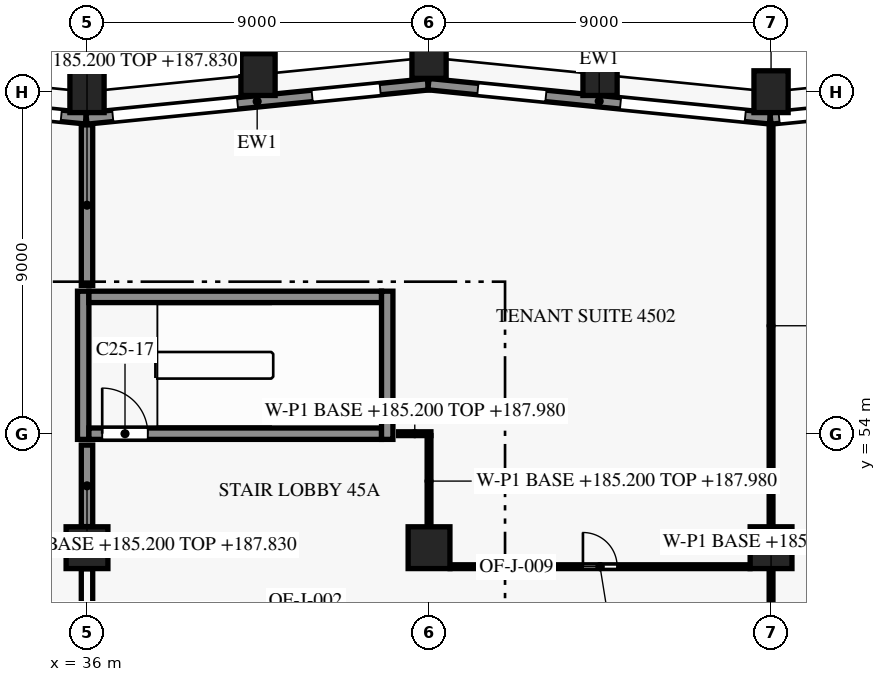
"""IFC4 building model, lengths in metres.
Left out: names, types, materials, properties, quantities, classifications, styles, units other than length and angle.
Written with IfcOpenShell. Run it as: python <this file> out.ifc"""

import sys

from ifc_helpers import new_model, si_unit, direction, frame, frame_2d, origin, origin_2d, place, context, subcontext, project, spatial, rectangle, extrude, element, fill, save


model = new_model("IFC4")
c1 = context("Model", 3, precision=1e-05, world=origin(), true_north=direction((0.0, 1.0)))
c2 = subcontext(c1, "Body", "Model", "MODEL_VIEW")
j1 = project(units=[si_unit("LENGTHUNIT", "METRE"), si_unit("PLANEANGLEUNIT", "RADIAN")], contexts=[c1])
p1 = place(None, origin())
s1 = spatial("IfcSite", under=j1, at=p1, CompositionType="ELEMENT")
p2 = place(p1, origin())
s2 = spatial("IfcBuilding", under=s1, at=p2, CompositionType="ELEMENT")
p3 = place(p2, frame((0.0, 0.0, 185.2)))
s3 = spatial("IfcBuildingStorey", under=s2, at=p3, CompositionType="ELEMENT", Elevation=185.2)
for number, where, z_axis, x_axis in (
    (1, (54.0, 63.0, 0.0), (0.0, 0.0, 1.0), (-1.0, 0.0, 0.0)),
    (2, (49.5, 63.45, 0.0), (0.0, 0.0, 1.0), (-0.995, 0.1, 0.0)),
    (3, (45.0, 63.9, 0.0), (0.0, 0.0, 1.0), (-1.0, 0.0, 0.0)),
    (4, (40.5, 63.45, 0.0), (0.0, 0.0, 1.0), (-0.995, -0.1, 0.0)),
    (5, (36.0, 63.0, 0.0), (0.0, 0.0, 1.0), (-1.0, 0.0, 0.0)),
):
    element("IfcColumn", number, at=place(p3, frame(where, z_axis=z_axis, x_axis=x_axis)), inside=s3, PredefinedType="COLUMN", context=c2, shape_type="SweptSolid", body=[
        extrude(rectangle(XDim=0.9, YDim=1.1, at=origin_2d()), origin(), (0.0, 0.0, 1.0), 3.8),
    ])
for number, where, z_axis, x_axis in (
    (6, (36.0, 51.0, 0.0), (0.0, 0.0, 1.0), (1.0, 0.0, 0.0)),
    (7, (45.0, 51.0, 0.0), (0.0, 0.0, 1.0), (1.0, 0.0, 0.0)),
    (8, (54.0, 51.0, 0.0), (0.0, 0.0, 1.0), (1.0, 0.0, 0.0)),
):
    element("IfcColumn", number, at=place(p3, frame(where, z_axis=z_axis, x_axis=x_axis)), inside=s3, PredefinedType="COLUMN", context=c2, shape_type="SweptSolid", body=[
        extrude(rectangle(XDim=1.1, YDim=1.1, at=origin_2d()), origin(), (0.0, 0.0, 1.0), 3.8),
    ])
p4 = place(p3, frame((53.985, 62.295, 0.0), z_axis=(0.0, 0.0, 1.0), x_axis=(0.99503719021, 0.099503719021, 0.0)))
e9 = element("IfcWall", 9, at=p4, inside=s3, PredefinedType="SOLIDWALL", context=c2, shape_type="SweptSolid", body=[
    extrude(rectangle(XDim=3.678, YDim=0.3, at=frame_2d((1.839, 0.0))), origin(), (0.0, 0.0, 1.0), 3.15),
])
p5 = place(p4, frame((0.228, 0.0, 0.15)))
e10 = element("IfcOpeningElement", 10, at=p5, cuts=e9, PredefinedType="OPENING", context=c2, shape_type="SweptSolid", body=[
    extrude(rectangle(XDim=3.3, YDim=2.4, at=frame_2d((1.65, 1.2))), frame((0.0, 0.16, 0.0), z_axis=(0.0, -1.0, 0.0), x_axis=(1.0, 0.0, 0.0)), (0.0, 0.0, 1.0), 0.32),
])
p6 = place(p3, frame((44.985, 63.198, 0.0), z_axis=(0.0, 0.0, 1.0), x_axis=(0.995037993253, -0.099495688264, 0.0)))
e11 = element("IfcWall", 11, at=p6, inside=s3, PredefinedType="SOLIDWALL", context=c2, shape_type="SweptSolid", body=[
    extrude(rectangle(XDim=9.03, YDim=0.3, at=frame_2d((4.515, 0.0))), origin(), (0.0, 0.0, 1.0), 3.15),
])
p7 = place(p6, frame((1.306, 0.0, 0.75)))
e12 = element("IfcOpeningElement", 12, at=p7, cuts=e11, PredefinedType="OPENING", context=c2, shape_type="SweptSolid", body=[
    extrude(rectangle(XDim=1.8, YDim=1.8, at=frame_2d((0.9, 0.9))), frame((0.0, 0.16, 0.0), z_axis=(0.0, -1.0, 0.0), x_axis=(1.0, 0.0, 0.0)), (0.0, 0.0, 1.0), 0.32),
])
p8 = place(p6, frame((5.079, 0.0, 0.15)))
e13 = element("IfcOpeningElement", 13, at=p8, cuts=e11, PredefinedType="OPENING", context=c2, shape_type="SweptSolid", body=[
    extrude(rectangle(XDim=3.3, YDim=2.4, at=frame_2d((1.65, 1.2))), frame((0.0, 0.16, 0.0), z_axis=(0.0, -1.0, 0.0), x_axis=(1.0, 0.0, 0.0)), (0.0, 0.0, 1.0), 0.32),
])
p9 = place(p3, frame((35.985, 62.295, 0.0), z_axis=(0.0, 0.0, 1.0), x_axis=(0.995035316196, 0.099522457379, 0.0)))
e14 = element("IfcWall", 14, at=p9, inside=s3, PredefinedType="SOLIDWALL", context=c2, shape_type="SweptSolid", body=[
    extrude(rectangle(XDim=9.03, YDim=0.3, at=frame_2d((4.515, 0.0))), origin(), (0.0, 0.0, 1.0), 3.15),
])
p10 = place(p9, frame((0.696, 0.0, 0.15)))
e15 = element("IfcOpeningElement", 15, at=p10, cuts=e14, PredefinedType="OPENING", context=c2, shape_type="SweptSolid", body=[
    extrude(rectangle(XDim=3.3, YDim=2.4, at=frame_2d((1.65, 1.2))), frame((0.0, 0.16, 0.0), z_axis=(0.0, -1.0, 0.0), x_axis=(1.0, 0.0, 0.0)), (0.0, 0.0, 1.0), 0.32),
])
p11 = place(p9, frame((5.969, 0.0, 0.75)))
e16 = element("IfcOpeningElement", 16, at=p11, cuts=e14, PredefinedType="OPENING", context=c2, shape_type="SweptSolid", body=[
    extrude(rectangle(XDim=1.8, YDim=1.8, at=frame_2d((0.9, 0.9))), frame((0.0, 0.16, 0.0), z_axis=(0.0, -1.0, 0.0), x_axis=(1.0, 0.0, 0.0)), (0.0, 0.0, 1.0), 0.32),
])
p12 = place(p3, frame((27.08, 63.189, 0.0), z_axis=(0.0, 0.0, 1.0), x_axis=(0.995036108007, -0.099514540459, 0.0)))
e17 = element("IfcWall", 17, at=p12, inside=s3, PredefinedType="SOLIDWALL", context=c2, shape_type="SweptSolid", body=[
    extrude(rectangle(XDim=8.935, YDim=0.3, at=frame_2d((4.468, 0.0))), origin(), (0.0, 0.0, 1.0), 3.15),
])
p13 = place(p12, frame((1.211, 0.0, 0.75)))
e18 = element("IfcOpeningElement", 18, at=p13, cuts=e17, PredefinedType="OPENING", context=c2, shape_type="SweptSolid", body=[
    extrude(rectangle(XDim=1.8, YDim=1.8, at=frame_2d((0.9, 0.9))), frame((0.0, 0.16, 0.0), z_axis=(0.0, -1.0, 0.0), x_axis=(1.0, 0.0, 0.0)), (0.0, 0.0, 1.0), 0.32),
])
p14 = place(p12, frame((4.984, 0.0, 0.15)))
e19 = element("IfcOpeningElement", 19, at=p14, cuts=e17, PredefinedType="OPENING", context=c2, shape_type="SweptSolid", body=[
    extrude(rectangle(XDim=3.3, YDim=2.4, at=frame_2d((1.65, 1.2))), frame((0.0, 0.16, 0.0), z_axis=(0.0, -1.0, 0.0), x_axis=(1.0, 0.0, 0.0)), (0.0, 0.0, 1.0), 0.32),
])
p15 = place(p3, frame((36.05, 54.0, 0.0), z_axis=(0.0, 0.0, 1.0), x_axis=(1.0, 0.0, 0.0)))
e20 = element("IfcWall", 20, at=p15, inside=s3, PredefinedType="SHEAR", context=c2, shape_type="SweptSolid", body=[
    extrude(rectangle(XDim=7.7, YDim=0.3, at=frame_2d((3.85, 0.0))), origin(), (0.0, 0.0, 1.0), 3.5),
])
p16 = place(p15, frame((0.35, 0.0, 0.0)))
e21 = element("IfcOpeningElement", 21, at=p16, cuts=e20, PredefinedType="OPENING", context=c2, shape_type="SweptSolid", body=[
    extrude(rectangle(XDim=1.2, YDim=2.2, at=frame_2d((0.6, 1.1))), frame((0.0, 0.16, 0.0), z_axis=(0.0, -1.0, 0.0), x_axis=(1.0, 0.0, 0.0)), (0.0, 0.0, 1.0), 0.32),
])
p17 = place(p3, frame((36.05, 57.6, 0.0), z_axis=(0.0, 0.0, 1.0), x_axis=(1.0, 0.0, 0.0)))
e22 = element("IfcWall", 22, at=p17, inside=s3, PredefinedType="SHEAR", context=c2, shape_type="SweptSolid", body=[
    extrude(rectangle(XDim=7.7, YDim=0.3, at=frame_2d((3.85, 0.0))), origin(), (0.0, 0.0, 1.0), 3.5),
])
for number, where, z_axis, x_axis in (
    (23, (35.9, 53.85, 0.0), (0.0, 0.0, 1.0), (0.0, 1.0, 0.0)),
    (24, (43.9, 53.85, 0.0), (0.0, 0.0, 1.0), (0.0, 1.0, 0.0)),
):
    element("IfcWall", number, at=place(p3, frame(where, z_axis=z_axis, x_axis=x_axis)), inside=s3, PredefinedType="SHEAR", context=c2, shape_type="SweptSolid", body=[
        extrude(rectangle(XDim=3.9, YDim=0.3, at=frame_2d((1.95, 0.0))), origin(), (0.0, 0.0, 1.0), 3.5),
    ])
p18 = place(p3, frame((36.0, 48.638, 0.0), z_axis=(0.0, 0.0, 1.0), x_axis=(0.0, 1.0, 0.0)))
e25 = element("IfcWall", 25, at=p18, inside=s3, PredefinedType="PARTITIONING", context=c2, shape_type="SweptSolid", body=[
    extrude(rectangle(XDim=1.807, YDim=0.3, at=frame_2d((0.904, 0.0))), origin(), (0.0, 0.0, 1.0), 2.63),
])
p19 = place(p3, frame((54.0, 50.445, 0.0), z_axis=(0.0, 0.0, 1.0), x_axis=(0.0, -1.0, 0.0)))
e26 = element("IfcWall", 26, at=p19, inside=s3, PredefinedType="PARTITIONING", context=c2, shape_type="SweptSolid", body=[
    extrude(rectangle(XDim=2.395, YDim=0.1, at=frame_2d((1.198, 0.0))), origin(), (0.0, 0.0, 1.0), 2.78),
])
p20 = place(p3, frame((45.555, 50.5, 0.0), z_axis=(0.0, 0.0, 1.0), x_axis=(1.0, 0.0, 0.0)))
e27 = element("IfcWall", 27, at=p20, inside=s3, PredefinedType="PARTITIONING", context=c2, shape_type="SweptSolid", body=[
    extrude(rectangle(XDim=7.89, YDim=0.1, at=frame_2d((3.945, 0.0))), origin(), (0.0, 0.0, 1.0), 3.33),
])
p21 = place(p20, frame((3.495, 0.0, 0.0)))
e28 = element("IfcOpeningElement", 28, at=p21, cuts=e27, PredefinedType="OPENING", context=c2, shape_type="SweptSolid", body=[
    extrude(rectangle(XDim=0.9, YDim=2.1, at=frame_2d((0.45, 1.05))), frame((0.0, 0.06, 0.0), z_axis=(0.0, -1.0, 0.0), x_axis=(1.0, 0.0, 0.0)), (0.0, 0.0, 1.0), 0.12),
])
p22 = place(p3, frame((36.0, 51.555, 0.0), z_axis=(0.0, 0.0, 1.0), x_axis=(0.0, 1.0, 0.0)))
e29 = element("IfcWall", 29, at=p22, inside=s3, PredefinedType="PARTITIONING", context=c2, shape_type="SweptSolid", body=[
    extrude(rectangle(XDim=2.145, YDim=0.3, at=frame_2d((1.073, 0.0))), origin(), (0.0, 0.0, 1.0), 2.63),
])
p23 = place(p3, frame((54.0, 51.555, 0.0), z_axis=(0.0, 0.0, 1.0), x_axis=(0.0, 1.0, 0.0)))
e30 = element("IfcWall", 30, at=p23, inside=s3, PredefinedType="PARTITIONING", context=c2, shape_type="SweptSolid", body=[
    extrude(rectangle(XDim=10.571, YDim=0.1, at=frame_2d((5.285, 0.0))), origin(), (0.0, 0.0, 1.0), 2.78),
])
p24 = place(p3, frame((45.0, 53.95, 0.0), z_axis=(0.0, 0.0, 1.0), x_axis=(0.0, -1.0, 0.0)))
e31 = element("IfcWall", 31, at=p24, inside=s3, PredefinedType="PARTITIONING", context=c2, shape_type="SweptSolid", body=[
    extrude(rectangle(XDim=2.395, YDim=0.1, at=frame_2d((1.198, 0.0))), origin(), (0.0, 0.0, 1.0), 2.78),
])
p25 = place(p3, frame((44.2, 54.0, 0.0), z_axis=(0.0, 0.0, 1.0), x_axis=(1.0, 0.0, 0.0)))
e32 = element("IfcWall", 32, at=p25, inside=s3, PredefinedType="PARTITIONING", context=c2, shape_type="SweptSolid", body=[
    extrude(rectangle(XDim=0.85, YDim=0.1, at=frame_2d((0.425, 0.0))), origin(), (0.0, 0.0, 1.0), 2.78),
])
p26 = place(p3, frame((36.0, 57.9, 0.0), z_axis=(0.0, 0.0, 1.0), x_axis=(0.0, 1.0, 0.0)))
e33 = element("IfcWall", 33, at=p26, inside=s3, PredefinedType="PARTITIONING", context=c2, shape_type="SweptSolid", body=[
    extrude(rectangle(XDim=4.226, YDim=0.3, at=frame_2d((2.113, 0.0))), origin(), (0.0, 0.0, 1.0), 2.63),
])
p27 = place(p5, origin())
e34 = element("IfcWindow", 34, at=p27, inside=s3, PartitioningType="SINGLE_PANEL", PredefinedType="WINDOW", context=c2, shape_type="SweptSolid", body=[
    extrude(rectangle(XDim=3.3, YDim=2.4, at=frame_2d((1.65, 1.2))), frame((0.0, 0.03, 0.0), z_axis=(0.0, -1.0, 0.0), x_axis=(1.0, 0.0, 0.0)), (0.0, 0.0, 1.0), 0.06),
])
fill(e10, e34)
p28 = place(p7, origin())
e35 = element("IfcWindow", 35, at=p28, inside=s3, PartitioningType="SINGLE_PANEL", PredefinedType="WINDOW", context=c2, shape_type="SweptSolid", body=[
    extrude(rectangle(XDim=1.8, YDim=1.8, at=frame_2d((0.9, 0.9))), frame((0.0, 0.03, 0.0), z_axis=(0.0, -1.0, 0.0), x_axis=(1.0, 0.0, 0.0)), (0.0, 0.0, 1.0), 0.06),
])
fill(e12, e35)
p29 = place(p8, origin())
e36 = element("IfcWindow", 36, at=p29, inside=s3, PartitioningType="SINGLE_PANEL", PredefinedType="WINDOW", context=c2, shape_type="SweptSolid", body=[
    extrude(rectangle(XDim=3.3, YDim=2.4, at=frame_2d((1.65, 1.2))), frame((0.0, 0.03, 0.0), z_axis=(0.0, -1.0, 0.0), x_axis=(1.0, 0.0, 0.0)), (0.0, 0.0, 1.0), 0.06),
])
fill(e13, e36)
p30 = place(p10, origin())
e37 = element("IfcWindow", 37, at=p30, inside=s3, PartitioningType="SINGLE_PANEL", PredefinedType="WINDOW", context=c2, shape_type="SweptSolid", body=[
    extrude(rectangle(XDim=3.3, YDim=2.4, at=frame_2d((1.65, 1.2))), frame((0.0, 0.03, 0.0), z_axis=(0.0, -1.0, 0.0), x_axis=(1.0, 0.0, 0.0)), (0.0, 0.0, 1.0), 0.06),
])
fill(e15, e37)
p31 = place(p11, origin())
e38 = element("IfcWindow", 38, at=p31, inside=s3, PartitioningType="SINGLE_PANEL", PredefinedType="WINDOW", context=c2, shape_type="SweptSolid", body=[
    extrude(rectangle(XDim=1.8, YDim=1.8, at=frame_2d((0.9, 0.9))), frame((0.0, 0.03, 0.0), z_axis=(0.0, -1.0, 0.0), x_axis=(1.0, 0.0, 0.0)), (0.0, 0.0, 1.0), 0.06),
])
fill(e16, e38)
p32 = place(p14, origin())
e39 = element("IfcWindow", 39, at=p32, inside=s3, PartitioningType="SINGLE_PANEL", PredefinedType="WINDOW", context=c2, shape_type="SweptSolid", body=[
    extrude(rectangle(XDim=3.3, YDim=2.4, at=frame_2d((1.65, 1.2))), frame((0.0, 0.03, 0.0), z_axis=(0.0, -1.0, 0.0), x_axis=(1.0, 0.0, 0.0)), (0.0, 0.0, 1.0), 0.06),
])
fill(e19, e39)
p33 = place(p16, origin())
e40 = element("IfcDoor", 40, at=p33, inside=s3, OperationType="SINGLE_SWING_LEFT", PredefinedType="DOOR", context=c2, shape_type="SweptSolid", body=[
    extrude(rectangle(XDim=1.2, YDim=2.2, at=frame_2d((0.6, 1.1))), frame((0.0, 0.025, 0.0), z_axis=(0.0, -1.0, 0.0), x_axis=(1.0, 0.0, 0.0)), (0.0, 0.0, 1.0), 0.05),
])
fill(e21, e40)
p34 = place(p21, origin())
e41 = element("IfcDoor", 41, at=p34, inside=s3, OperationType="SINGLE_SWING_LEFT", PredefinedType="DOOR", context=c2, shape_type="SweptSolid", body=[
    extrude(rectangle(XDim=0.9, YDim=2.1, at=frame_2d((0.45, 1.05))), frame((0.0, 0.025, 0.0), z_axis=(0.0, -1.0, 0.0), x_axis=(1.0, 0.0, 0.0)), (0.0, 0.0, 1.0), 0.05),
])
fill(e28, e41)
save(model, sys.argv[1])
